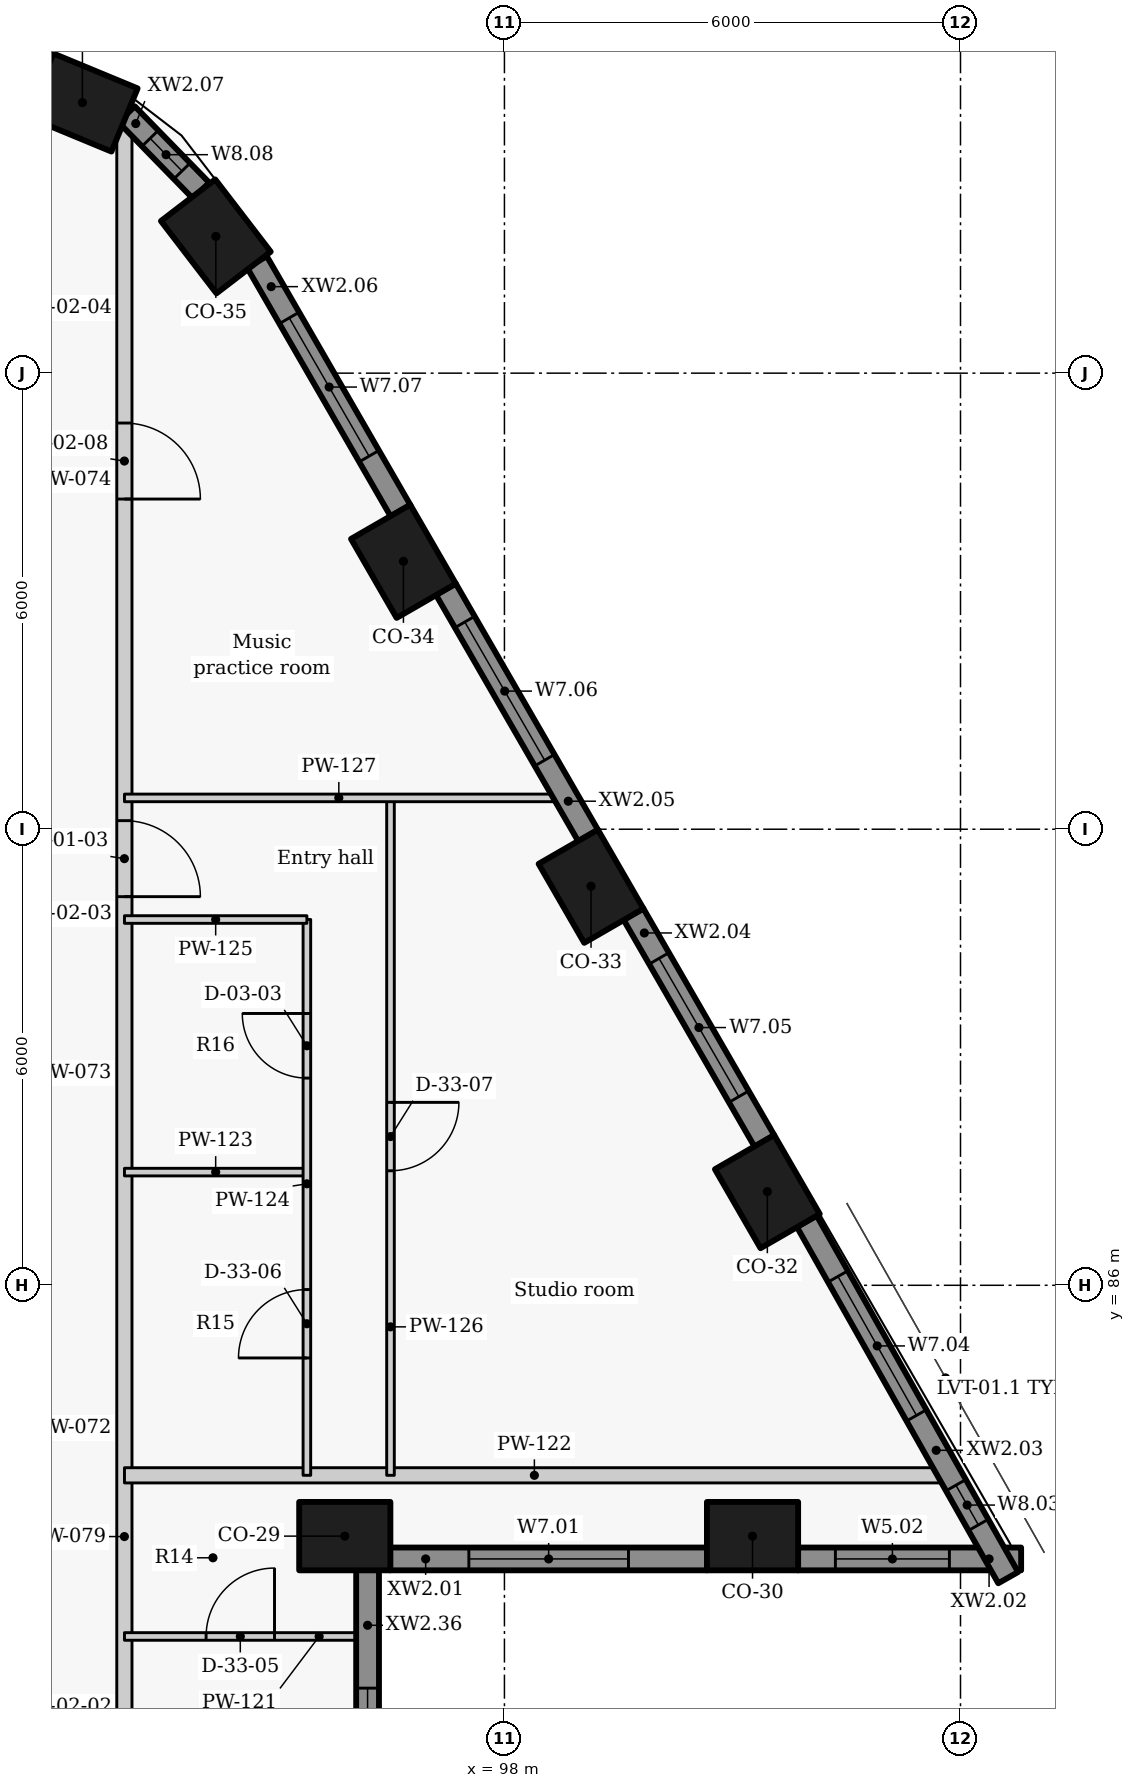
"""IFC4 building model, lengths in metres.
Left out: names, types, materials, properties, quantities, classifications, styles, units other than length and angle.
Written with IfcOpenShell. Run it as: python <this file> out.ifc"""

import sys

from ifc_helpers import new_model, si_unit, direction, frame, frame_2d, origin, origin_2d, place, context, subcontext, project, spatial, rectangle, extrude, element, fill, save


model = new_model("IFC4")
c1 = context("Model", 3, precision=1e-05, world=origin(), true_north=direction((0.0, 1.0)))
c2 = subcontext(c1, "Body", "Model", "MODEL_VIEW")
j1 = project(units=[si_unit("LENGTHUNIT", "METRE"), si_unit("PLANEANGLEUNIT", "RADIAN")], contexts=[c1])
p1 = place(None, origin())
s1 = spatial("IfcSite", under=j1, at=p1, CompositionType="ELEMENT")
p2 = place(p1, origin())
s2 = spatial("IfcBuilding", under=s1, at=p2, CompositionType="ELEMENT")
p3 = place(p2, frame((0.0, 0.0, 193.2)))
s3 = spatial("IfcBuildingStorey", under=s2, at=p3, CompositionType="ELEMENT", Elevation=193.2)
for number, where, z_axis, x_axis in (
    (1, (95.899, 82.7, 0.0), (0.0, 0.0, 1.0), (1.0, 0.0, 0.0)),
    (2, (101.264, 82.7, 0.0), (0.0, 0.0, 1.0), (1.0, 0.0, 0.0)),
    (3, (101.459, 87.232, 0.0), (0.0, 0.0, 1.0), (-0.5, 0.866, 0.0)),
    (4, (99.139, 91.25, 0.0), (0.0, 0.0, 1.0), (-0.5, 0.866, 0.0)),
    (5, (96.671, 95.525, 0.0), (0.0, 0.0, 1.0), (-0.5, 0.866, 0.0)),
    (6, (94.203, 99.8, 0.0), (0.0, 0.0, 1.0), (-0.609, 0.793, 0.0)),
    (7, (92.448, 101.56, 0.0), (0.0, 0.0, 1.0), (-0.924, 0.383, 0.0)),
):
    element("IfcColumn", number, at=place(p3, frame(where, z_axis=z_axis, x_axis=x_axis)), inside=s3, PredefinedType="COLUMN", context=c2, shape_type="SweptSolid", body=[
        extrude(rectangle(XDim=1.2, YDim=0.9, at=origin_2d()), origin(), (0.0, 0.0, 1.0), 3.3),
    ])
p4 = place(p3, frame((96.496, 82.4, 0.0), z_axis=(0.0, 0.0, 1.0), x_axis=(1.0, 0.0, 0.0)))
e8 = element("IfcWall", 8, at=p4, inside=s3, PredefinedType="SOLIDWALL", context=c2, shape_type="SweptSolid", body=[
    extrude(rectangle(XDim=4.172, YDim=0.3, at=frame_2d((2.086, 0.0))), origin(), (0.0, 0.0, 1.0), 2.425),
])
p5 = place(p4, frame((1.036, 0.0, 0.9)))
e9 = element("IfcOpeningElement", 9, at=p5, cuts=e8, PredefinedType="OPENING", context=c2, shape_type="SweptSolid", body=[
    extrude(rectangle(XDim=2.1, YDim=1.1, at=frame_2d((1.05, 0.55))), frame((0.0, 0.16, 0.0), z_axis=(0.0, -1.0, 0.0), x_axis=(1.0, 0.0, 0.0)), (0.0, 0.0, 1.0), 0.32),
])
p6 = place(p3, frame((101.86, 82.4, 0.0), z_axis=(0.0, 0.0, 1.0), x_axis=(1.0, 0.0, 0.0)))
e10 = element("IfcWall", 10, at=p6, inside=s3, PredefinedType="SOLIDWALL", context=c2, shape_type="SweptSolid", body=[
    extrude(rectangle(XDim=2.938, YDim=0.3, at=frame_2d((1.469, 0.0))), origin(), (0.0, 0.0, 1.0), 2.425),
])
p7 = place(p6, frame((0.494, 0.0, 0.9)))
e11 = element("IfcOpeningElement", 11, at=p7, cuts=e10, PredefinedType="OPENING", context=c2, shape_type="SweptSolid", body=[
    extrude(rectangle(XDim=1.5, YDim=1.1, at=frame_2d((0.75, 0.55))), frame((0.0, 0.16, 0.0), z_axis=(0.0, -1.0, 0.0), x_axis=(1.0, 0.0, 0.0)), (0.0, 0.0, 1.0), 0.32),
])
p8 = place(p3, frame((104.627, 82.154, 0.0), z_axis=(0.0, 0.0, 1.0), x_axis=(-0.492033360928, 0.870576344575, 0.0)))
e12 = element("IfcWall", 12, at=p8, inside=s3, PredefinedType="SOLIDWALL", context=c2, shape_type="SweptSolid", body=[
    extrude(rectangle(XDim=5.387, YDim=0.3, at=frame_2d((2.693, 0.0))), origin(), (0.0, 0.0, 1.0), 2.425),
])
p9 = place(p8, frame((0.797, 0.0, 0.9)))
e13 = element("IfcOpeningElement", 13, at=p9, cuts=e12, PredefinedType="OPENING", context=c2, shape_type="SweptSolid", body=[
    extrude(rectangle(XDim=0.6, YDim=1.1, at=frame_2d((0.3, 0.55))), frame((0.0, 0.16, 0.0), z_axis=(0.0, -1.0, 0.0), x_axis=(1.0, 0.0, 0.0)), (0.0, 0.0, 1.0), 0.32),
])
p10 = place(p8, frame((2.452, 0.0, 0.9)))
e14 = element("IfcOpeningElement", 14, at=p10, cuts=e12, PredefinedType="OPENING", context=c2, shape_type="SweptSolid", body=[
    extrude(rectangle(XDim=2.1, YDim=1.1, at=frame_2d((1.05, 0.55))), frame((0.0, 0.16, 0.0), z_axis=(0.0, -1.0, 0.0), x_axis=(1.0, 0.0, 0.0)), (0.0, 0.0, 1.0), 0.32),
])
p11 = place(p3, frame((101.421, 87.898, 0.0), z_axis=(0.0, 0.0, 1.0), x_axis=(-0.499955427682, 0.866051136095, 0.0)))
e15 = element("IfcWall", 15, at=p11, inside=s3, PredefinedType="SOLIDWALL", context=c2, shape_type="SweptSolid", body=[
    extrude(rectangle(XDim=3.447, YDim=0.3, at=frame_2d((1.724, 0.0))), origin(), (0.0, 0.0, 1.0), 2.425),
])
p12 = place(p11, frame((0.674, 0.0, 0.9)))
e16 = element("IfcOpeningElement", 16, at=p12, cuts=e15, PredefinedType="OPENING", context=c2, shape_type="SweptSolid", body=[
    extrude(rectangle(XDim=2.1, YDim=1.1, at=frame_2d((1.05, 0.55))), frame((0.0, 0.16, 0.0), z_axis=(0.0, -1.0, 0.0), x_axis=(1.0, 0.0, 0.0)), (0.0, 0.0, 1.0), 0.32),
])
p13 = place(p3, frame((99.101, 91.916, 0.0), z_axis=(0.0, 0.0, 1.0), x_axis=(-0.500059225181, 0.86599120741, 0.0)))
e17 = element("IfcWall", 17, at=p13, inside=s3, PredefinedType="SOLIDWALL", context=c2, shape_type="SweptSolid", body=[
    extrude(rectangle(XDim=3.744, YDim=0.3, at=frame_2d((1.872, 0.0))), origin(), (0.0, 0.0, 1.0), 2.425),
])
p14 = place(p13, frame((1.145, 0.0, 0.9)))
e18 = element("IfcOpeningElement", 18, at=p14, cuts=e17, PredefinedType="OPENING", context=c2, shape_type="SweptSolid", body=[
    extrude(rectangle(XDim=2.1, YDim=1.1, at=frame_2d((1.05, 0.55))), frame((0.0, 0.16, 0.0), z_axis=(0.0, -1.0, 0.0), x_axis=(1.0, 0.0, 0.0)), (0.0, 0.0, 1.0), 0.32),
])
p15 = place(p3, frame((96.633, 96.191, 0.0), z_axis=(0.0, 0.0, 1.0), x_axis=(-0.499961087031, 0.866047869032, 0.0)))
e19 = element("IfcWall", 19, at=p15, inside=s3, PredefinedType="SOLIDWALL", context=c2, shape_type="SweptSolid", body=[
    extrude(rectangle(XDim=3.779, YDim=0.3, at=frame_2d((1.889, 0.0))), origin(), (0.0, 0.0, 1.0), 2.425),
])
p16 = place(p15, frame((0.828, 0.0, 0.9)))
e20 = element("IfcOpeningElement", 20, at=p16, cuts=e19, PredefinedType="OPENING", context=c2, shape_type="SweptSolid", body=[
    extrude(rectangle(XDim=2.1, YDim=1.1, at=frame_2d((1.05, 0.55))), frame((0.0, 0.16, 0.0), z_axis=(0.0, -1.0, 0.0), x_axis=(1.0, 0.0, 0.0)), (0.0, 0.0, 1.0), 0.32),
])
p17 = place(p3, frame((94.009, 100.402, 0.0), z_axis=(0.0, 0.0, 1.0), x_axis=(-0.69817596362, 0.715926199984, 0.0)))
e21 = element("IfcWall", 21, at=p17, inside=s3, PredefinedType="SOLIDWALL", context=c2, shape_type="SweptSolid", body=[
    extrude(rectangle(XDim=1.403, YDim=0.3, at=frame_2d((0.701, 0.0))), origin(), (0.0, 0.0, 1.0), 2.425),
])
p18 = place(p17, frame((0.36, 0.0, 0.9)))
e22 = element("IfcOpeningElement", 22, at=p18, cuts=e21, PredefinedType="OPENING", context=c2, shape_type="SweptSolid", body=[
    extrude(rectangle(XDim=0.6, YDim=1.1, at=frame_2d((0.3, 0.55))), frame((0.0, 0.16, 0.0), z_axis=(0.0, -1.0, 0.0), x_axis=(1.0, 0.0, 0.0)), (0.0, 0.0, 1.0), 0.32),
])
p19 = place(p3, frame((96.199, 77.896, 0.0), z_axis=(0.0, 0.0, 1.0), x_axis=(0.0, 1.0, 0.0)))
e23 = element("IfcWall", 23, at=p19, inside=s3, PredefinedType="SOLIDWALL", context=c2, shape_type="SweptSolid", body=[
    extrude(rectangle(XDim=4.358, YDim=0.3, at=frame_2d((2.179, 0.0))), origin(), (0.0, 0.0, 1.0), 2.425),
])
p20 = place(p19, frame((0.704, 0.0, 0.9)))
e24 = element("IfcOpeningElement", 24, at=p20, cuts=e23, PredefinedType="OPENING", context=c2, shape_type="SweptSolid", body=[
    extrude(rectangle(XDim=2.1, YDim=1.1, at=frame_2d((1.05, 0.55))), frame((0.0, 0.16, 0.0), z_axis=(0.0, -1.0, 0.0), x_axis=(1.0, 0.0, 0.0)), (0.0, 0.0, 1.0), 0.32),
])
p21 = place(p3, frame((93.0, 101.281, 0.0), z_axis=(0.0, 0.0, 1.0), x_axis=(0.0, -1.0, 0.0)))
e25 = element("IfcWall", 25, at=p21, inside=s3, PredefinedType="PARTITIONING", context=c2, shape_type="SweptSolid", body=[
    extrude(rectangle(XDim=42.606, YDim=0.2, at=frame_2d((21.303, 0.0))), origin(), (0.0, 0.0, 1.0), 2.405),
])
p22 = place(p21, frame((39.33, 0.0, 0.0)))
e26 = element("IfcOpeningElement", 26, at=p22, cuts=e25, PredefinedType="OPENING", context=c2, shape_type="SweptSolid", body=[
    extrude(rectangle(XDim=1.0, YDim=2.1, at=frame_2d((0.5, 1.05))), frame((0.0, 0.11, 0.0), z_axis=(0.0, -1.0, 0.0), x_axis=(1.0, 0.0, 0.0)), (0.0, 0.0, 1.0), 0.22),
])
p23 = place(p21, frame((27.005, 0.0, 0.0)))
e27 = element("IfcOpeningElement", 27, at=p23, cuts=e25, PredefinedType="OPENING", context=c2, shape_type="SweptSolid", body=[
    extrude(rectangle(XDim=1.0, YDim=2.1, at=frame_2d((0.5, 1.05))), frame((0.0, 0.11, 0.0), z_axis=(0.0, -1.0, 0.0), x_axis=(1.0, 0.0, 0.0)), (0.0, 0.0, 1.0), 0.22),
])
p24 = place(p21, frame((9.168, 0.0, 0.0)))
e28 = element("IfcOpeningElement", 28, at=p24, cuts=e25, PredefinedType="OPENING", context=c2, shape_type="SweptSolid", body=[
    extrude(rectangle(XDim=1.0, YDim=2.1, at=frame_2d((0.5, 1.05))), frame((0.0, 0.11, 0.0), z_axis=(0.0, -1.0, 0.0), x_axis=(1.0, 0.0, 0.0)), (0.0, 0.0, 1.0), 0.22),
])
p25 = place(p21, frame((3.937, 0.0, 0.0)))
e29 = element("IfcOpeningElement", 29, at=p25, cuts=e25, PredefinedType="OPENING", context=c2, shape_type="SweptSolid", body=[
    extrude(rectangle(XDim=1.0, YDim=2.1, at=frame_2d((0.5, 1.05))), frame((0.0, 0.11, 0.0), z_axis=(0.0, -1.0, 0.0), x_axis=(1.0, 0.0, 0.0)), (0.0, 0.0, 1.0), 0.22),
])
p26 = place(p3, frame((93.001, 81.38, 0.0), z_axis=(0.0, 0.0, 1.0), x_axis=(1.0, 0.0, 0.0)))
e30 = element("IfcWall", 30, at=p26, inside=s3, PredefinedType="PARTITIONING", context=c2, shape_type="SweptSolid", body=[
    extrude(rectangle(XDim=3.049, YDim=0.1, at=frame_2d((1.524, 0.0))), origin(), (0.0, 0.0, 1.0), 2.405),
])
p27 = place(p26, frame((1.074, 0.0, 0.0)))
e31 = element("IfcOpeningElement", 31, at=p27, cuts=e30, PredefinedType="OPENING", context=c2, shape_type="SweptSolid", body=[
    extrude(rectangle(XDim=0.9, YDim=2.1, at=frame_2d((0.45, 1.05))), frame((0.0, 0.06, 0.0), z_axis=(0.0, -1.0, 0.0), x_axis=(1.0, 0.0, 0.0)), (0.0, 0.0, 1.0), 0.12),
])
p28 = place(p3, frame((93.001, 83.5, 0.0), z_axis=(0.0, 0.0, 1.0), x_axis=(1.0, 0.0, 0.0)))
e32 = element("IfcWall", 32, at=p28, inside=s3, PredefinedType="PARTITIONING", context=c2, shape_type="SweptSolid", body=[
    extrude(rectangle(XDim=10.786, YDim=0.2, at=frame_2d((5.393, 0.0))), origin(), (0.0, 0.0, 1.0), 2.405),
])
p29 = place(p3, frame((93.001, 87.489, 0.0), z_axis=(0.0, 0.0, 1.0), x_axis=(1.0, 0.0, 0.0)))
e33 = element("IfcWall", 33, at=p29, inside=s3, PredefinedType="PARTITIONING", context=c2, shape_type="SweptSolid", body=[
    extrude(rectangle(XDim=2.4, YDim=0.1, at=frame_2d((1.2, 0.0))), origin(), (0.0, 0.0, 1.0), 3.025),
])
p30 = place(p3, frame((95.401, 83.5, 0.0), z_axis=(0.0, 0.0, 1.0), x_axis=(0.0, 1.0, 0.0)))
e34 = element("IfcWall", 34, at=p30, inside=s3, PredefinedType="PARTITIONING", context=c2, shape_type="SweptSolid", body=[
    extrude(rectangle(XDim=7.312, YDim=0.1, at=frame_2d((3.656, 0.0))), origin(), (0.0, 0.0, 1.0), 3.025),
])
p31 = place(p30, frame((1.544, 0.0, 0.0)))
e35 = element("IfcOpeningElement", 35, at=p31, cuts=e34, PredefinedType="OPENING", context=c2, shape_type="SweptSolid", body=[
    extrude(rectangle(XDim=0.9, YDim=2.1, at=frame_2d((0.45, 1.05))), frame((0.0, 0.06, 0.0), z_axis=(0.0, -1.0, 0.0), x_axis=(1.0, 0.0, 0.0)), (0.0, 0.0, 1.0), 0.12),
])
p32 = place(p30, frame((5.226, 0.0, 0.0)))
e36 = element("IfcOpeningElement", 36, at=p32, cuts=e34, PredefinedType="OPENING", context=c2, shape_type="SweptSolid", body=[
    extrude(rectangle(XDim=0.85, YDim=2.1, at=frame_2d((0.425, 1.05))), frame((0.0, 0.06, 0.0), z_axis=(0.0, -1.0, 0.0), x_axis=(1.0, 0.0, 0.0)), (0.0, 0.0, 1.0), 0.12),
])
p33 = place(p3, frame((93.001, 90.812, 0.0), z_axis=(0.0, 0.0, 1.0), x_axis=(1.0, 0.0, 0.0)))
e37 = element("IfcWall", 37, at=p33, inside=s3, PredefinedType="PARTITIONING", context=c2, shape_type="SweptSolid", body=[
    extrude(rectangle(XDim=2.4, YDim=0.1, at=frame_2d((1.2, 0.0))), origin(), (0.0, 0.0, 1.0), 3.025),
])
p34 = place(p3, frame((96.501, 92.413, 0.0), z_axis=(0.0, 0.0, 1.0), x_axis=(0.0, -1.0, 0.0)))
e38 = element("IfcWall", 38, at=p34, inside=s3, PredefinedType="PARTITIONING", context=c2, shape_type="SweptSolid", body=[
    extrude(rectangle(XDim=8.913, YDim=0.1, at=frame_2d((4.456, 0.0))), origin(), (0.0, 0.0, 1.0), 3.025),
])
p35 = place(p34, frame((4.006, 0.0, 0.0)))
e39 = element("IfcOpeningElement", 39, at=p35, cuts=e38, PredefinedType="OPENING", context=c2, shape_type="SweptSolid", body=[
    extrude(rectangle(XDim=0.9, YDim=2.1, at=frame_2d((0.45, 1.05))), frame((0.0, 0.06, 0.0), z_axis=(0.0, -1.0, 0.0), x_axis=(1.0, 0.0, 0.0)), (0.0, 0.0, 1.0), 0.12),
])
p36 = place(p3, frame((93.001, 92.412, 0.0), z_axis=(0.0, 0.0, 1.0), x_axis=(1.0, 0.0, 0.0)))
e40 = element("IfcWall", 40, at=p36, inside=s3, PredefinedType="PARTITIONING", context=c2, shape_type="SweptSolid", body=[
    extrude(rectangle(XDim=5.64, YDim=0.1, at=frame_2d((2.82, 0.0))), origin(), (0.0, 0.0, 1.0), 2.405),
])
p37 = place(p5, origin())
e41 = element("IfcWindow", 41, at=p37, inside=s3, PartitioningType="SINGLE_PANEL", PredefinedType="WINDOW", context=c2, shape_type="SweptSolid", body=[
    extrude(rectangle(XDim=2.1, YDim=1.1, at=frame_2d((1.05, 0.55))), frame((0.0, 0.03, 0.0), z_axis=(0.0, -1.0, 0.0), x_axis=(1.0, 0.0, 0.0)), (0.0, 0.0, 1.0), 0.06),
])
fill(e9, e41)
p38 = place(p7, origin())
e42 = element("IfcWindow", 42, at=p38, inside=s3, PartitioningType="SINGLE_PANEL", PredefinedType="WINDOW", context=c2, shape_type="SweptSolid", body=[
    extrude(rectangle(XDim=1.5, YDim=1.1, at=frame_2d((0.75, 0.55))), frame((0.0, 0.03, 0.0), z_axis=(0.0, -1.0, 0.0), x_axis=(1.0, 0.0, 0.0)), (0.0, 0.0, 1.0), 0.06),
])
fill(e11, e42)
p39 = place(p9, origin())
e43 = element("IfcWindow", 43, at=p39, inside=s3, PartitioningType="SINGLE_PANEL", PredefinedType="WINDOW", context=c2, shape_type="SweptSolid", body=[
    extrude(rectangle(XDim=0.6, YDim=1.1, at=frame_2d((0.3, 0.55))), frame((0.0, 0.03, 0.0), z_axis=(0.0, -1.0, 0.0), x_axis=(1.0, 0.0, 0.0)), (0.0, 0.0, 1.0), 0.06),
])
fill(e13, e43)
p40 = place(p10, origin())
e44 = element("IfcWindow", 44, at=p40, inside=s3, PartitioningType="SINGLE_PANEL", PredefinedType="WINDOW", context=c2, shape_type="SweptSolid", body=[
    extrude(rectangle(XDim=2.1, YDim=1.1, at=frame_2d((1.05, 0.55))), frame((0.0, 0.03, 0.0), z_axis=(0.0, -1.0, 0.0), x_axis=(1.0, 0.0, 0.0)), (0.0, 0.0, 1.0), 0.06),
])
fill(e14, e44)
p41 = place(p12, origin())
e45 = element("IfcWindow", 45, at=p41, inside=s3, PartitioningType="SINGLE_PANEL", PredefinedType="WINDOW", context=c2, shape_type="SweptSolid", body=[
    extrude(rectangle(XDim=2.1, YDim=1.1, at=frame_2d((1.05, 0.55))), frame((0.0, 0.03, 0.0), z_axis=(0.0, -1.0, 0.0), x_axis=(1.0, 0.0, 0.0)), (0.0, 0.0, 1.0), 0.06),
])
fill(e16, e45)
p42 = place(p14, origin())
e46 = element("IfcWindow", 46, at=p42, inside=s3, PartitioningType="SINGLE_PANEL", PredefinedType="WINDOW", context=c2, shape_type="SweptSolid", body=[
    extrude(rectangle(XDim=2.1, YDim=1.1, at=frame_2d((1.05, 0.55))), frame((0.0, 0.03, 0.0), z_axis=(0.0, -1.0, 0.0), x_axis=(1.0, 0.0, 0.0)), (0.0, 0.0, 1.0), 0.06),
])
fill(e18, e46)
p43 = place(p16, origin())
e47 = element("IfcWindow", 47, at=p43, inside=s3, PartitioningType="SINGLE_PANEL", PredefinedType="WINDOW", context=c2, shape_type="SweptSolid", body=[
    extrude(rectangle(XDim=2.1, YDim=1.1, at=frame_2d((1.05, 0.55))), frame((0.0, 0.03, 0.0), z_axis=(0.0, -1.0, 0.0), x_axis=(1.0, 0.0, 0.0)), (0.0, 0.0, 1.0), 0.06),
])
fill(e20, e47)
p44 = place(p18, origin())
e48 = element("IfcWindow", 48, at=p44, inside=s3, PartitioningType="SINGLE_PANEL", PredefinedType="WINDOW", context=c2, shape_type="SweptSolid", body=[
    extrude(rectangle(XDim=0.6, YDim=1.1, at=frame_2d((0.3, 0.55))), frame((0.0, 0.03, 0.0), z_axis=(0.0, -1.0, 0.0), x_axis=(1.0, 0.0, 0.0)), (0.0, 0.0, 1.0), 0.06),
])
fill(e22, e48)
p45 = place(p20, origin())
e49 = element("IfcWindow", 49, at=p45, inside=s3, PartitioningType="SINGLE_PANEL", PredefinedType="WINDOW", context=c2, shape_type="SweptSolid", body=[
    extrude(rectangle(XDim=2.1, YDim=1.1, at=frame_2d((1.05, 0.55))), frame((0.0, 0.03, 0.0), z_axis=(0.0, -1.0, 0.0), x_axis=(1.0, 0.0, 0.0)), (0.0, 0.0, 1.0), 0.06),
])
fill(e24, e49)
p46 = place(p27, origin())
e50 = element("IfcDoor", 50, at=p46, inside=s3, OperationType="SINGLE_SWING_RIGHT", PredefinedType="DOOR", context=c2, shape_type="SweptSolid", body=[
    extrude(rectangle(XDim=0.9, YDim=2.1, at=frame_2d((0.45, 1.05))), frame((0.0, 0.025, 0.0), z_axis=(0.0, -1.0, 0.0), x_axis=(1.0, 0.0, 0.0)), (0.0, 0.0, 1.0), 0.05),
])
fill(e31, e50)
p47 = place(p24, origin())
e51 = element("IfcDoor", 51, at=p47, inside=s3, OperationType="SINGLE_SWING_RIGHT", PredefinedType="DOOR", context=c2, shape_type="SweptSolid", body=[
    extrude(rectangle(XDim=1.0, YDim=2.1, at=frame_2d((0.5, 1.05))), frame((0.0, 0.025, 0.0), z_axis=(0.0, -1.0, 0.0), x_axis=(1.0, 0.0, 0.0)), (0.0, 0.0, 1.0), 0.05),
])
fill(e28, e51)
p48 = place(p31, origin())
e52 = element("IfcDoor", 52, at=p48, inside=s3, OperationType="SINGLE_SWING_LEFT", PredefinedType="DOOR", context=c2, shape_type="SweptSolid", body=[
    extrude(rectangle(XDim=0.9, YDim=2.1, at=frame_2d((0.45, 1.05))), frame((0.0, 0.025, 0.0), z_axis=(0.0, -1.0, 0.0), x_axis=(1.0, 0.0, 0.0)), (0.0, 0.0, 1.0), 0.05),
])
fill(e35, e52)
p49 = place(p32, origin())
e53 = element("IfcDoor", 53, at=p49, inside=s3, OperationType="SINGLE_SWING_RIGHT", PredefinedType="DOOR", context=c2, shape_type="SweptSolid", body=[
    extrude(rectangle(XDim=0.85, YDim=2.1, at=frame_2d((0.425, 1.05))), frame((0.0, 0.025, 0.0), z_axis=(0.0, -1.0, 0.0), x_axis=(1.0, 0.0, 0.0)), (0.0, 0.0, 1.0), 0.05),
])
fill(e36, e53)
p50 = place(p35, origin())
e54 = element("IfcDoor", 54, at=p50, inside=s3, OperationType="SINGLE_SWING_LEFT", PredefinedType="DOOR", context=c2, shape_type="SweptSolid", body=[
    extrude(rectangle(XDim=0.9, YDim=2.1, at=frame_2d((0.45, 1.05))), frame((0.0, 0.025, 0.0), z_axis=(0.0, -1.0, 0.0), x_axis=(1.0, 0.0, 0.0)), (0.0, 0.0, 1.0), 0.05),
])
fill(e39, e54)
p51 = place(p25, origin())
e55 = element("IfcDoor", 55, at=p51, inside=s3, OperationType="SINGLE_SWING_RIGHT", PredefinedType="DOOR", context=c2, shape_type="SweptSolid", body=[
    extrude(rectangle(XDim=1.0, YDim=2.1, at=frame_2d((0.5, 1.05))), frame((0.0, 0.025, 0.0), z_axis=(0.0, -1.0, 0.0), x_axis=(1.0, 0.0, 0.0)), (0.0, 0.0, 1.0), 0.05),
])
fill(e29, e55)
save(model, sys.argv[1])
